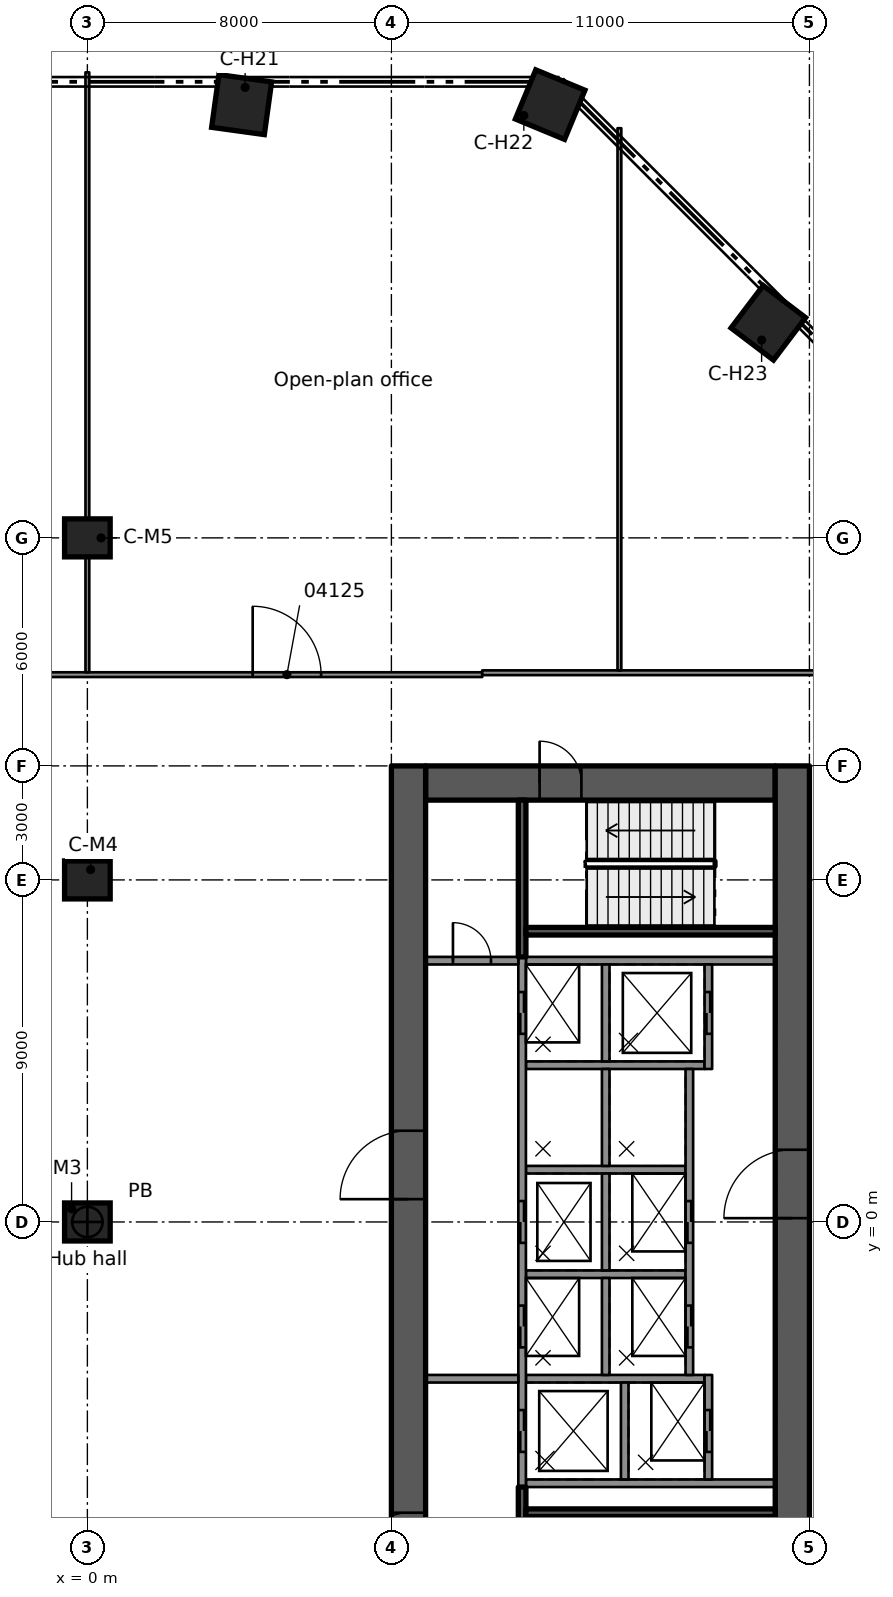
"""IFC4 building model, lengths in metres.
Left out: names, types, materials, properties, quantities, classifications, styles, units other than length and angle.
Written with IfcOpenShell. Run it as: python <this file> out.ifc"""

import sys

from ifc_helpers import new_model, si_unit, direction, frame, frame_2d, origin, origin_2d, place, context, subcontext, project, spatial, rectangle, extrude, element, fill, save


model = new_model("IFC4")
c1 = context("Model", 3, precision=1e-05, world=origin(), true_north=direction((0.0, 1.0)))
c2 = subcontext(c1, "Body", "Model", "MODEL_VIEW")
j1 = project(units=[si_unit("LENGTHUNIT", "METRE"), si_unit("PLANEANGLEUNIT", "RADIAN")], contexts=[c1])
p1 = place(None, origin())
s1 = spatial("IfcSite", under=j1, at=p1, CompositionType="ELEMENT")
p2 = place(p1, origin())
s2 = spatial("IfcBuilding", under=s1, at=p2, CompositionType="ELEMENT")
p3 = place(p2, frame((0.0, 0.0, 20.5)))
s3 = spatial("IfcBuildingStorey", under=s2, at=p3, CompositionType="ELEMENT", Elevation=20.5)
p4 = place(p3, frame((8.9, 11.55, 0.0), z_axis=(0.0, 0.0, 1.0), x_axis=(1.0, 0.0, 0.0)))
e1 = element("IfcWall", 1, at=p4, inside=s3, PredefinedType="SHEAR", context=c2, shape_type="SweptSolid", body=[
    extrude(rectangle(XDim=9.2, YDim=0.9, at=frame_2d((4.6, 0.0))), origin(), (0.0, 0.0, 1.0), 4.6),
])
p5 = place(p4, frame((3.0, 0.0, 0.0)))
e2 = element("IfcOpeningElement", 2, at=p5, cuts=e1, PredefinedType="OPENING", context=c2, shape_type="SweptSolid", body=[
    extrude(rectangle(XDim=1.1, YDim=2.1, at=frame_2d((0.55, 1.05))), frame((0.0, 0.46, 0.0), z_axis=(0.0, -1.0, 0.0), x_axis=(1.0, 0.0, 0.0)), (0.0, 0.0, 1.0), 0.92),
])
p6 = place(p3, frame((8.45, -12.0, 0.0), z_axis=(0.0, 0.0, 1.0), x_axis=(0.0, 1.0, 0.0)))
e3 = element("IfcWall", 3, at=p6, inside=s3, PredefinedType="SHEAR", context=c2, shape_type="SweptSolid", body=[
    extrude(rectangle(XDim=24.0, YDim=0.9, at=frame_2d((12.0, 0.0))), origin(), (0.0, 0.0, 1.0), 4.6),
])
p7 = place(p6, frame((12.6, 0.0, 0.0)))
e4 = element("IfcOpeningElement", 4, at=p7, cuts=e3, PredefinedType="OPENING", context=c2, shape_type="SweptSolid", body=[
    extrude(rectangle(XDim=1.8, YDim=2.1, at=frame_2d((0.9, 1.05))), frame((0.0, 0.46, 0.0), z_axis=(0.0, -1.0, 0.0), x_axis=(1.0, 0.0, 0.0)), (0.0, 0.0, 1.0), 0.92),
])
p8 = place(p6, frame((3.25, 0.0, 0.0)))
e5 = element("IfcOpeningElement", 5, at=p8, cuts=e3, PredefinedType="OPENING", context=c2, shape_type="SweptSolid", body=[
    extrude(rectangle(XDim=1.1, YDim=2.1, at=frame_2d((0.55, 1.05))), frame((0.0, 0.46, 0.0), z_axis=(0.0, -1.0, 0.0), x_axis=(1.0, 0.0, 0.0)), (0.0, 0.0, 1.0), 0.92),
])
p9 = place(p3, frame((18.55, -12.0, 0.0), z_axis=(0.0, 0.0, 1.0), x_axis=(0.0, 1.0, 0.0)))
e6 = element("IfcWall", 6, at=p9, inside=s3, PredefinedType="SHEAR", context=c2, shape_type="SweptSolid", body=[
    extrude(rectangle(XDim=24.0, YDim=0.9, at=frame_2d((12.0, 0.0))), origin(), (0.0, 0.0, 1.0), 4.6),
])
p10 = place(p9, frame((12.1, 0.0, 0.0)))
e7 = element("IfcOpeningElement", 7, at=p10, cuts=e6, PredefinedType="OPENING", context=c2, shape_type="SweptSolid", body=[
    extrude(rectangle(XDim=1.8, YDim=2.1, at=frame_2d((0.9, 1.05))), frame((0.0, 0.46, 0.0), z_axis=(0.0, -1.0, 0.0), x_axis=(1.0, 0.0, 0.0)), (0.0, 0.0, 1.0), 0.92),
])
for number, where, z_axis, x_axis in (
    (8, (4.059, 29.4, 0.0), (0.0, 0.0, 1.0), (0.137, 0.991, 0.0)),
    (9, (12.178, 29.4, 0.0), (0.0, 0.0, 1.0), (0.383, 0.924, 0.0)),
    (10, (17.919, 23.659, 0.0), (0.0, 0.0, 1.0), (0.604, 0.797, 0.0)),
):
    element("IfcColumn", number, at=place(p3, frame(where, z_axis=z_axis, x_axis=x_axis)), inside=s3, PredefinedType="COLUMN", context=c2, shape_type="SweptSolid", body=[
        extrude(rectangle(XDim=1.4, YDim=1.4, at=origin_2d()), origin(), (0.0, 0.0, 1.0), 4.6),
    ])
for number, where, z_axis, x_axis in (
    (11, (0.0, 0.0, 0.0), (0.0, 0.0, 1.0), (1.0, 0.0, 0.0)),
    (12, (0.0, 9.0, 0.0), (0.0, 0.0, 1.0), (1.0, 0.0, 0.0)),
    (13, (0.0, 18.0, 0.0), (0.0, 0.0, 1.0), (1.0, 0.0, 0.0)),
):
    element("IfcColumn", number, at=place(p3, frame(where, z_axis=z_axis, x_axis=x_axis)), inside=s3, PredefinedType="COLUMN", context=c2, shape_type="SweptSolid", body=[
        extrude(rectangle(XDim=1.2, YDim=1.0, at=origin_2d()), origin(), (0.0, 0.0, 1.0), 4.6),
    ])
for number, where, z_axis, x_axis in (
    (14, (11.54, -6.875, 0.0), (0.0, 0.0, 1.0), (1.0, 0.0, 0.0)),
    (15, (11.54, 6.875, 0.0), (0.0, 0.0, 1.0), (1.0, 0.0, 0.0)),
):
    element("IfcWall", number, at=place(p3, frame(where, z_axis=z_axis, x_axis=x_axis)), inside=s3, PredefinedType="SOLIDWALL", context=c2, shape_type="SweptSolid", body=[
        extrude(rectangle(XDim=6.56, YDim=0.2, at=frame_2d((3.28, 0.0))), origin(), (0.0, 0.0, 1.0), 4.18),
    ])
p11 = place(p3, frame((11.54, 4.125, 0.0), z_axis=(0.0, 0.0, 1.0), x_axis=(1.0, 0.0, 0.0)))
e16 = element("IfcWall", 16, at=p11, inside=s3, PredefinedType="SOLIDWALL", context=c2, shape_type="SweptSolid", body=[
    extrude(rectangle(XDim=4.7, YDim=0.2, at=frame_2d((2.35, 0.0))), origin(), (0.0, 0.0, 1.0), 4.18),
])
for number, where, z_axis, x_axis in (
    (17, (11.54, 1.375, 0.0), (0.0, 0.0, 1.0), (1.0, 0.0, 0.0)),
    (18, (11.54, -1.375, 0.0), (0.0, 0.0, 1.0), (1.0, 0.0, 0.0)),
):
    element("IfcWall", number, at=place(p3, frame(where, z_axis=z_axis, x_axis=x_axis)), inside=s3, PredefinedType="SOLIDWALL", context=c2, shape_type="SweptSolid", body=[
        extrude(rectangle(XDim=4.2, YDim=0.2, at=frame_2d((2.1, 0.0))), origin(), (0.0, 0.0, 1.0), 4.18),
    ])
p12 = place(p3, frame((11.54, -4.125, 0.0), z_axis=(0.0, 0.0, 1.0), x_axis=(1.0, 0.0, 0.0)))
e19 = element("IfcWall", 19, at=p12, inside=s3, PredefinedType="SOLIDWALL", context=c2, shape_type="SweptSolid", body=[
    extrude(rectangle(XDim=4.7, YDim=0.2, at=frame_2d((2.35, 0.0))), origin(), (0.0, 0.0, 1.0), 4.18),
])
p13 = place(p3, frame((11.44, 6.975, 0.0), z_axis=(0.0, 0.0, 1.0), x_axis=(0.0, -1.0, 0.0)))
e20 = element("IfcWall", 20, at=p13, inside=s3, PredefinedType="SOLIDWALL", context=c2, shape_type="SweptSolid", body=[
    extrude(rectangle(XDim=13.95, YDim=0.2, at=frame_2d((6.975, 0.0))), origin(), (0.0, 0.0, 1.0), 4.18),
])
p14 = place(p13, frame((0.925, 0.0, 0.0)))
e21 = element("IfcOpeningElement", 21, at=p14, cuts=e20, PredefinedType="OPENING", context=c2, shape_type="SweptSolid", body=[
    extrude(rectangle(XDim=1.1, YDim=2.1, at=frame_2d((0.55, 1.05))), frame((0.0, 0.11, 0.0), z_axis=(0.0, -1.0, 0.0), x_axis=(1.0, 0.0, 0.0)), (0.0, 0.0, 1.0), 0.22),
])
p15 = place(p13, frame((6.425, 0.0, 0.0)))
e22 = element("IfcOpeningElement", 22, at=p15, cuts=e20, PredefinedType="OPENING", context=c2, shape_type="SweptSolid", body=[
    extrude(rectangle(XDim=1.1, YDim=2.1, at=frame_2d((0.55, 1.05))), frame((0.0, 0.11, 0.0), z_axis=(0.0, -1.0, 0.0), x_axis=(1.0, 0.0, 0.0)), (0.0, 0.0, 1.0), 0.22),
])
p16 = place(p13, frame((9.175, 0.0, 0.0)))
e23 = element("IfcOpeningElement", 23, at=p16, cuts=e20, PredefinedType="OPENING", context=c2, shape_type="SweptSolid", body=[
    extrude(rectangle(XDim=1.1, YDim=2.1, at=frame_2d((0.55, 1.05))), frame((0.0, 0.11, 0.0), z_axis=(0.0, -1.0, 0.0), x_axis=(1.0, 0.0, 0.0)), (0.0, 0.0, 1.0), 0.22),
])
p17 = place(p13, frame((11.925, 0.0, 0.0)))
e24 = element("IfcOpeningElement", 24, at=p17, cuts=e20, PredefinedType="OPENING", context=c2, shape_type="SweptSolid", body=[
    extrude(rectangle(XDim=1.1, YDim=2.1, at=frame_2d((0.55, 1.05))), frame((0.0, 0.11, 0.0), z_axis=(0.0, -1.0, 0.0), x_axis=(1.0, 0.0, 0.0)), (0.0, 0.0, 1.0), 0.22),
])
for number, where, z_axis, x_axis in (
    (25, (13.64, 6.775, 0.0), (0.0, 0.0, 1.0), (0.0, -1.0, 0.0)),
    (26, (13.64, 4.025, 0.0), (0.0, 0.0, 1.0), (0.0, -1.0, 0.0)),
    (27, (13.64, 1.275, 0.0), (0.0, 0.0, 1.0), (0.0, -1.0, 0.0)),
    (28, (13.64, -1.475, 0.0), (0.0, 0.0, 1.0), (0.0, -1.0, 0.0)),
    (29, (14.14, -4.225, 0.0), (0.0, 0.0, 1.0), (0.0, -1.0, 0.0)),
):
    element("IfcWall", number, at=place(p3, frame(where, z_axis=z_axis, x_axis=x_axis)), inside=s3, PredefinedType="SOLIDWALL", context=c2, shape_type="SweptSolid", body=[
        extrude(rectangle(XDim=2.55, YDim=0.2, at=frame_2d((1.275, 0.0))), origin(), (0.0, 0.0, 1.0), 4.18),
    ])
p18 = place(p3, frame((16.34, 6.775, 0.0), z_axis=(0.0, 0.0, 1.0), x_axis=(0.0, -1.0, 0.0)))
e30 = element("IfcWall", 30, at=p18, inside=s3, PredefinedType="SOLIDWALL", context=c2, shape_type="SweptSolid", body=[
    extrude(rectangle(XDim=2.75, YDim=0.2, at=frame_2d((1.375, 0.0))), origin(), (0.0, 0.0, 1.0), 4.18),
])
p19 = place(p18, frame((0.725, 0.0, 0.0)))
e31 = element("IfcOpeningElement", 31, at=p19, cuts=e30, PredefinedType="OPENING", context=c2, shape_type="SweptSolid", body=[
    extrude(rectangle(XDim=1.1, YDim=2.1, at=frame_2d((0.55, 1.05))), frame((0.0, 0.11, 0.0), z_axis=(0.0, -1.0, 0.0), x_axis=(1.0, 0.0, 0.0)), (0.0, 0.0, 1.0), 0.22),
])
p20 = place(p3, frame((15.84, 4.025, 0.0), z_axis=(0.0, 0.0, 1.0), x_axis=(0.0, -1.0, 0.0)))
e32 = element("IfcWall", 32, at=p20, inside=s3, PredefinedType="SOLIDWALL", context=c2, shape_type="SweptSolid", body=[
    extrude(rectangle(XDim=8.05, YDim=0.2, at=frame_2d((4.025, 0.0))), origin(), (0.0, 0.0, 1.0), 4.18),
])
p21 = place(p20, frame((3.475, 0.0, 0.0)))
e33 = element("IfcOpeningElement", 33, at=p21, cuts=e32, PredefinedType="OPENING", context=c2, shape_type="SweptSolid", body=[
    extrude(rectangle(XDim=1.1, YDim=2.1, at=frame_2d((0.55, 1.05))), frame((0.0, 0.11, 0.0), z_axis=(0.0, -1.0, 0.0), x_axis=(1.0, 0.0, 0.0)), (0.0, 0.0, 1.0), 0.22),
])
p22 = place(p20, frame((6.225, 0.0, 0.0)))
e34 = element("IfcOpeningElement", 34, at=p22, cuts=e32, PredefinedType="OPENING", context=c2, shape_type="SweptSolid", body=[
    extrude(rectangle(XDim=1.1, YDim=2.1, at=frame_2d((0.55, 1.05))), frame((0.0, 0.11, 0.0), z_axis=(0.0, -1.0, 0.0), x_axis=(1.0, 0.0, 0.0)), (0.0, 0.0, 1.0), 0.22),
])
p23 = place(p3, frame((16.34, -4.025, 0.0), z_axis=(0.0, 0.0, 1.0), x_axis=(0.0, -1.0, 0.0)))
e35 = element("IfcWall", 35, at=p23, inside=s3, PredefinedType="SOLIDWALL", context=c2, shape_type="SweptSolid", body=[
    extrude(rectangle(XDim=2.75, YDim=0.2, at=frame_2d((1.375, 0.0))), origin(), (0.0, 0.0, 1.0), 4.18),
])
p24 = place(p23, frame((0.925, 0.0, 0.0)))
e36 = element("IfcOpeningElement", 36, at=p24, cuts=e35, PredefinedType="OPENING", context=c2, shape_type="SweptSolid", body=[
    extrude(rectangle(XDim=1.1, YDim=2.1, at=frame_2d((0.55, 1.05))), frame((0.0, 0.11, 0.0), z_axis=(0.0, -1.0, 0.0), x_axis=(1.0, 0.0, 0.0)), (0.0, 0.0, 1.0), 0.22),
])
p25 = place(p3, frame((11.44, -6.975, 0.0), z_axis=(0.0, 0.0, 1.0), x_axis=(0.0, -1.0, 0.0)))
e37 = element("IfcWall", 37, at=p25, inside=s3, PredefinedType="SOLIDWALL", context=c2, shape_type="SweptSolid", body=[
    extrude(rectangle(XDim=4.125, YDim=0.2, at=frame_2d((2.062, 0.0))), origin(), (0.0, 0.0, 1.0), 4.18),
])
p26 = place(p25, frame((2.1, 0.0, 0.0)))
e38 = element("IfcOpeningElement", 38, at=p26, cuts=e37, PredefinedType="OPENING", context=c2, shape_type="SweptSolid", body=[
    extrude(rectangle(XDim=1.1, YDim=2.1, at=frame_2d((0.55, 1.05))), frame((0.0, 0.11, 0.0), z_axis=(0.0, -1.0, 0.0), x_axis=(1.0, 0.0, 0.0)), (0.0, 0.0, 1.0), 0.22),
])
p27 = place(p3, frame((11.54, -7.65, 0.0), z_axis=(0.0, 0.0, 1.0), x_axis=(1.0, 0.0, 0.0)))
e39 = element("IfcWall", 39, at=p27, inside=s3, PredefinedType="SOLIDWALL", context=c2, shape_type="SweptSolid", body=[
    extrude(rectangle(XDim=6.56, YDim=0.2, at=frame_2d((3.28, 0.0))), origin(), (0.0, 0.0, 1.0), 4.18),
])
p28 = place(p3, frame((11.44, 11.1, 0.0), z_axis=(0.0, 0.0, 1.0), x_axis=(0.0, -1.0, 0.0)))
e40 = element("IfcWall", 40, at=p28, inside=s3, PredefinedType="SOLIDWALL", context=c2, shape_type="SweptSolid", body=[
    extrude(rectangle(XDim=4.125, YDim=0.2, at=frame_2d((2.062, 0.0))), origin(), (0.0, 0.0, 1.0), 4.18),
])
p29 = place(p3, frame((11.54, 7.65, 0.0), z_axis=(0.0, 0.0, 1.0), x_axis=(1.0, 0.0, 0.0)))
e41 = element("IfcWall", 41, at=p29, inside=s3, PredefinedType="SOLIDWALL", context=c2, shape_type="SweptSolid", body=[
    extrude(rectangle(XDim=6.56, YDim=0.2, at=frame_2d((3.28, 0.0))), origin(), (0.0, 0.0, 1.0), 4.18),
])
p30 = place(p3, frame((8.9, -4.125, 0.0), z_axis=(0.0, 0.0, 1.0), x_axis=(1.0, 0.0, 0.0)))
e42 = element("IfcWall", 42, at=p30, inside=s3, PredefinedType="PARTITIONING", context=c2, shape_type="SweptSolid", body=[
    extrude(rectangle(XDim=2.44, YDim=0.2, at=frame_2d((1.22, 0.0))), origin(), (0.0, 0.0, 1.0), 4.18),
])
p31 = place(p3, frame((8.9, 6.875, 0.0), z_axis=(0.0, 0.0, 1.0), x_axis=(1.0, 0.0, 0.0)))
e43 = element("IfcWall", 43, at=p31, inside=s3, PredefinedType="PARTITIONING", context=c2, shape_type="SweptSolid", body=[
    extrude(rectangle(XDim=2.44, YDim=0.2, at=frame_2d((1.22, 0.0))), origin(), (0.0, 0.0, 1.0), 4.18),
])
p32 = place(p31, frame((0.72, 0.0, 0.0)))
e44 = element("IfcOpeningElement", 44, at=p32, cuts=e43, PredefinedType="OPENING", context=c2, shape_type="SweptSolid", body=[
    extrude(rectangle(XDim=1.0, YDim=2.1, at=frame_2d((0.5, 1.05))), frame((0.0, 0.11, 0.0), z_axis=(0.0, -1.0, 0.0), x_axis=(1.0, 0.0, 0.0)), (0.0, 0.0, 1.0), 0.22),
])
p33 = place(p3, frame((-10.39, 14.401, 0.0), z_axis=(0.0, 0.0, 1.0), x_axis=(1.0, 0.0, 0.0)))
e45 = element("IfcWall", 45, at=p33, inside=s3, PredefinedType="PARTITIONING", context=c2, shape_type="SweptSolid", body=[
    extrude(rectangle(XDim=20.781, YDim=0.125, at=frame_2d((10.391, 0.0))), origin(), (0.0, 0.0, 1.0), 4.16),
])
p34 = place(p33, frame((14.74, 0.0, 0.0)))
e46 = element("IfcOpeningElement", 46, at=p34, cuts=e45, PredefinedType="OPENING", context=c2, shape_type="SweptSolid", body=[
    extrude(rectangle(XDim=1.8, YDim=2.1, at=frame_2d((0.9, 1.05))), frame((0.0, 0.073, 0.0), z_axis=(0.0, -1.0, 0.0), x_axis=(1.0, 0.0, 0.0)), (0.0, 0.0, 1.0), 0.145),
])
p35 = place(p33, frame((4.35, 0.0, 0.0)))
e47 = element("IfcOpeningElement", 47, at=p35, cuts=e45, PredefinedType="OPENING", context=c2, shape_type="SweptSolid", body=[
    extrude(rectangle(XDim=1.8, YDim=2.1, at=frame_2d((0.9, 1.05))), frame((0.0, 0.073, 0.0), z_axis=(0.0, -1.0, 0.0), x_axis=(1.0, 0.0, 0.0)), (0.0, 0.0, 1.0), 0.145),
])
p36 = place(p3, frame((10.391, 14.451, 0.0), z_axis=(0.0, 0.0, 1.0), x_axis=(1.0, 0.0, 0.0)))
e48 = element("IfcWall", 48, at=p36, inside=s3, PredefinedType="PARTITIONING", context=c2, shape_type="SweptSolid", body=[
    extrude(rectangle(XDim=10.996, YDim=0.125, at=frame_2d((5.498, 0.0))), origin(), (0.0, 0.0, 1.0), 4.16),
])
p37 = place(p3, frame((41.84, -6.58, 0.0), z_axis=(0.0, 0.0, 1.0), x_axis=(-0.608763818445, -0.793351506807, 0.0)))
e49 = element("IfcWall", 49, at=p37, inside=s3, PredefinedType="PARTITIONING", context=c2, shape_type="SweptSolid", body=[
    extrude(rectangle(XDim=40.5, YDim=0.1, at=frame_2d((20.25, 0.0))), origin(), (0.0, 0.0, 1.0), 4.16),
])
p38 = place(p37, frame((19.75, 0.0, 0.0)))
e50 = element("IfcOpeningElement", 50, at=p38, cuts=e49, PredefinedType="OPENING", context=c2, shape_type="SweptSolid", body=[
    extrude(rectangle(XDim=0.9, YDim=2.1, at=frame_2d((0.45, 1.05))), frame((0.0, 0.06, 0.0), z_axis=(0.0, -1.0, 0.0), x_axis=(1.0, 0.0, 0.0)), (0.0, 0.0, 1.0), 0.12),
])
p39 = place(p3, frame((14.0, 14.514, 0.0), z_axis=(0.0, 0.0, 1.0), x_axis=(0.0, 1.0, 0.0)))
e51 = element("IfcWall", 51, at=p39, inside=s3, PredefinedType="PARTITIONING", context=c2, shape_type="SweptSolid", body=[
    extrude(rectangle(XDim=14.266, YDim=0.1, at=frame_2d((7.133, 0.0))), origin(), (0.0, 0.0, 1.0), 4.16),
])
p40 = place(p3, frame((0.0, 14.463, 0.0), z_axis=(0.0, 0.0, 1.0), x_axis=(0.0, 1.0, 0.0)))
e52 = element("IfcWall", 52, at=p40, inside=s3, PredefinedType="PARTITIONING", context=c2, shape_type="SweptSolid", body=[
    extrude(rectangle(XDim=15.787, YDim=0.1, at=frame_2d((7.894, 0.0))), origin(), (0.0, 0.0, 1.0), 4.16),
])
p41 = place(p14, origin())
e53 = element("IfcDoor", 53, at=p41, inside=s3, OperationType="DOUBLE_DOOR_SLIDING", PredefinedType="DOOR", context=c2, shape_type="SweptSolid", body=[
    extrude(rectangle(XDim=1.1, YDim=2.1, at=frame_2d((0.55, 1.05))), frame((0.0, 0.025, 0.0), z_axis=(0.0, -1.0, 0.0), x_axis=(1.0, 0.0, 0.0)), (0.0, 0.0, 1.0), 0.05),
])
fill(e21, e53)
p42 = place(p19, origin())
e54 = element("IfcDoor", 54, at=p42, inside=s3, OperationType="DOUBLE_DOOR_SLIDING", PredefinedType="DOOR", context=c2, shape_type="SweptSolid", body=[
    extrude(rectangle(XDim=1.1, YDim=2.1, at=frame_2d((0.55, 1.05))), frame((0.0, 0.025, 0.0), z_axis=(0.0, -1.0, 0.0), x_axis=(1.0, 0.0, 0.0)), (0.0, 0.0, 1.0), 0.05),
])
fill(e31, e54)
p43 = place(p15, origin())
e55 = element("IfcDoor", 55, at=p43, inside=s3, OperationType="DOUBLE_DOOR_SLIDING", PredefinedType="DOOR", context=c2, shape_type="SweptSolid", body=[
    extrude(rectangle(XDim=1.1, YDim=2.1, at=frame_2d((0.55, 1.05))), frame((0.0, 0.025, 0.0), z_axis=(0.0, -1.0, 0.0), x_axis=(1.0, 0.0, 0.0)), (0.0, 0.0, 1.0), 0.05),
])
fill(e22, e55)
p44 = place(p21, origin())
e56 = element("IfcDoor", 56, at=p44, inside=s3, OperationType="DOUBLE_DOOR_SLIDING", PredefinedType="DOOR", context=c2, shape_type="SweptSolid", body=[
    extrude(rectangle(XDim=1.1, YDim=2.1, at=frame_2d((0.55, 1.05))), frame((0.0, 0.025, 0.0), z_axis=(0.0, -1.0, 0.0), x_axis=(1.0, 0.0, 0.0)), (0.0, 0.0, 1.0), 0.05),
])
fill(e33, e56)
p45 = place(p16, origin())
e57 = element("IfcDoor", 57, at=p45, inside=s3, OperationType="DOUBLE_DOOR_SLIDING", PredefinedType="DOOR", context=c2, shape_type="SweptSolid", body=[
    extrude(rectangle(XDim=1.1, YDim=2.1, at=frame_2d((0.55, 1.05))), frame((0.0, 0.025, 0.0), z_axis=(0.0, -1.0, 0.0), x_axis=(1.0, 0.0, 0.0)), (0.0, 0.0, 1.0), 0.05),
])
fill(e23, e57)
p46 = place(p22, origin())
e58 = element("IfcDoor", 58, at=p46, inside=s3, OperationType="DOUBLE_DOOR_SLIDING", PredefinedType="DOOR", context=c2, shape_type="SweptSolid", body=[
    extrude(rectangle(XDim=1.1, YDim=2.1, at=frame_2d((0.55, 1.05))), frame((0.0, 0.025, 0.0), z_axis=(0.0, -1.0, 0.0), x_axis=(1.0, 0.0, 0.0)), (0.0, 0.0, 1.0), 0.05),
])
fill(e34, e58)
p47 = place(p17, origin())
e59 = element("IfcDoor", 59, at=p47, inside=s3, OperationType="DOUBLE_DOOR_SLIDING", PredefinedType="DOOR", context=c2, shape_type="SweptSolid", body=[
    extrude(rectangle(XDim=1.1, YDim=2.1, at=frame_2d((0.55, 1.05))), frame((0.0, 0.025, 0.0), z_axis=(0.0, -1.0, 0.0), x_axis=(1.0, 0.0, 0.0)), (0.0, 0.0, 1.0), 0.05),
])
fill(e24, e59)
p48 = place(p24, origin())
e60 = element("IfcDoor", 60, at=p48, inside=s3, OperationType="DOUBLE_DOOR_SLIDING", PredefinedType="DOOR", context=c2, shape_type="SweptSolid", body=[
    extrude(rectangle(XDim=1.1, YDim=2.1, at=frame_2d((0.55, 1.05))), frame((0.0, 0.025, 0.0), z_axis=(0.0, -1.0, 0.0), x_axis=(1.0, 0.0, 0.0)), (0.0, 0.0, 1.0), 0.05),
])
fill(e36, e60)
p49 = place(p7, origin())
e61 = element("IfcDoor", 61, at=p49, inside=s3, OperationType="SINGLE_SWING_RIGHT", PredefinedType="DOOR", context=c2, shape_type="SweptSolid", body=[
    extrude(rectangle(XDim=1.8, YDim=2.1, at=frame_2d((0.9, 1.05))), frame((0.0, 0.025, 0.0), z_axis=(0.0, -1.0, 0.0), x_axis=(1.0, 0.0, 0.0)), (0.0, 0.0, 1.0), 0.05),
])
fill(e4, e61)
p50 = place(p10, origin())
e62 = element("IfcDoor", 62, at=p50, inside=s3, OperationType="SINGLE_SWING_RIGHT", PredefinedType="DOOR", context=c2, shape_type="SweptSolid", body=[
    extrude(rectangle(XDim=1.8, YDim=2.1, at=frame_2d((0.9, 1.05))), frame((0.0, 0.025, 0.0), z_axis=(0.0, -1.0, 0.0), x_axis=(1.0, 0.0, 0.0)), (0.0, 0.0, 1.0), 0.05),
])
fill(e7, e62)
p51 = place(p8, origin())
e63 = element("IfcDoor", 63, at=p51, inside=s3, OperationType="SINGLE_SWING_LEFT", PredefinedType="DOOR", context=c2, shape_type="SweptSolid", body=[
    extrude(rectangle(XDim=1.1, YDim=2.1, at=frame_2d((0.55, 1.05))), frame((0.0, 0.025, 0.0), z_axis=(0.0, -1.0, 0.0), x_axis=(1.0, 0.0, 0.0)), (0.0, 0.0, 1.0), 0.05),
])
fill(e5, e63)
p52 = place(p5, origin())
e64 = element("IfcDoor", 64, at=p52, inside=s3, OperationType="SINGLE_SWING_LEFT", PredefinedType="DOOR", context=c2, shape_type="SweptSolid", body=[
    extrude(rectangle(XDim=1.1, YDim=2.1, at=frame_2d((0.55, 1.05))), frame((0.0, 0.025, 0.0), z_axis=(0.0, -1.0, 0.0), x_axis=(1.0, 0.0, 0.0)), (0.0, 0.0, 1.0), 0.05),
])
fill(e2, e64)
p53 = place(p32, origin())
e65 = element("IfcDoor", 65, at=p53, inside=s3, OperationType="SINGLE_SWING_RIGHT", PredefinedType="DOOR", context=c2, shape_type="SweptSolid", body=[
    extrude(rectangle(XDim=1.0, YDim=2.1, at=frame_2d((0.5, 1.05))), frame((0.0, 0.025, 0.0), z_axis=(0.0, -1.0, 0.0), x_axis=(1.0, 0.0, 0.0)), (0.0, 0.0, 1.0), 0.05),
])
fill(e44, e65)
p54 = place(p34, origin())
e66 = element("IfcDoor", 66, at=p54, inside=s3, OperationType="DOUBLE_DOOR_SINGLE_SWING", PredefinedType="DOOR", context=c2, shape_type="SweptSolid", body=[
    extrude(rectangle(XDim=1.8, YDim=2.1, at=frame_2d((0.9, 1.05))), frame((0.0, 0.025, 0.0), z_axis=(0.0, -1.0, 0.0), x_axis=(1.0, 0.0, 0.0)), (0.0, 0.0, 1.0), 0.05),
])
fill(e46, e66)
save(model, sys.argv[1])
